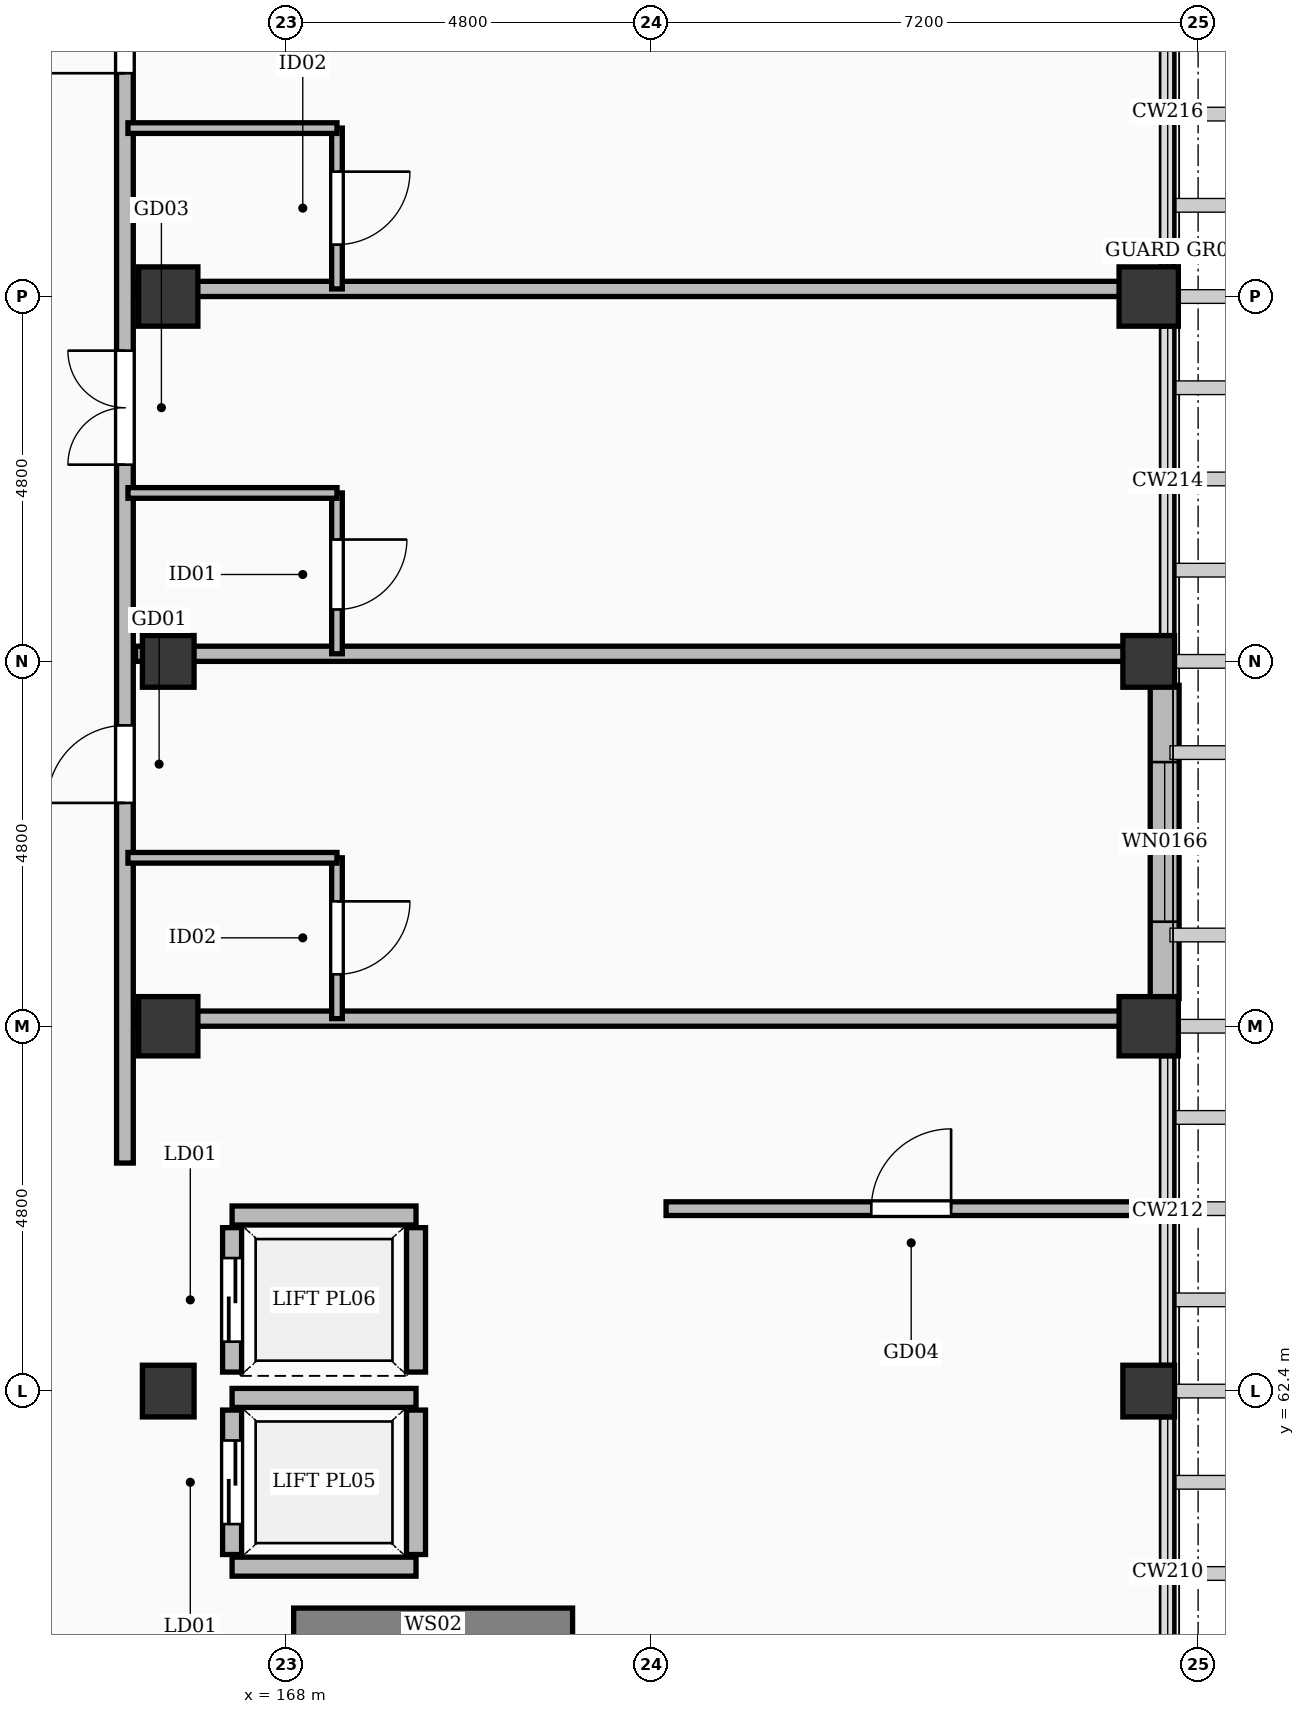
"""IFC4 building model, lengths in metres.
Left out: names, types, materials, properties, quantities, classifications, styles, units other than length and angle.
Written with IfcOpenShell. Run it as: python <this file> out.ifc"""

import sys

from ifc_helpers import new_model, si_unit, direction, frame, frame_2d, origin, origin_2d, place, context, subcontext, project, spatial, rectangle, extrude, element, fill, save


model = new_model("IFC4")
c1 = context("Model", 3, precision=1e-05, world=origin(), true_north=direction((0.0, 1.0)))
c2 = subcontext(c1, "Body", "Model", "MODEL_VIEW")
j1 = project(units=[si_unit("LENGTHUNIT", "METRE"), si_unit("PLANEANGLEUNIT", "RADIAN")], contexts=[c1])
p1 = place(None, origin())
s1 = spatial("IfcSite", under=j1, at=p1, CompositionType="ELEMENT")
p2 = place(p1, origin())
s2 = spatial("IfcBuilding", under=s1, at=p2, CompositionType="ELEMENT")
p3 = place(p2, frame((0.0, 0.0, 24.6)))
s3 = spatial("IfcBuildingStorey", under=s2, at=p3, CompositionType="ELEMENT", Elevation=24.6)
for number, where, z_axis, x_axis in (
    (1, (166.45, 67.2, 0.0), (0.0, 0.0, 1.0), (1.0, 0.0, 0.0)),
    (2, (166.45, 76.8, 0.0), (0.0, 0.0, 1.0), (1.0, 0.0, 0.0)),
    (3, (179.35, 67.2, 0.0), (0.0, 0.0, 1.0), (1.0, 0.0, 0.0)),
    (4, (179.35, 76.8, 0.0), (0.0, 0.0, 1.0), (1.0, 0.0, 0.0)),
):
    element("IfcColumn", number, at=place(p3, frame(where, z_axis=z_axis, x_axis=x_axis)), inside=s3, PredefinedType="COLUMN", context=c2, shape_type="SweptSolid", body=[
        extrude(rectangle(XDim=0.78, YDim=0.78, at=origin_2d()), origin(), (0.0, 0.0, 1.0), 3.6),
    ])
for number, where, z_axis, x_axis in (
    (5, (166.45, 62.4, 0.0), (0.0, 0.0, 1.0), (1.0, 0.0, 0.0)),
    (6, (166.45, 72.0, 0.0), (0.0, 0.0, 1.0), (1.0, 0.0, 0.0)),
    (7, (179.35, 62.4, 0.0), (0.0, 0.0, 1.0), (1.0, 0.0, 0.0)),
    (8, (179.35, 72.0, 0.0), (0.0, 0.0, 1.0), (1.0, 0.0, 0.0)),
):
    element("IfcColumn", number, at=place(p3, frame(where, z_axis=z_axis, x_axis=x_axis)), inside=s3, PredefinedType="COLUMN", context=c2, shape_type="SweptSolid", body=[
        extrude(rectangle(XDim=0.68, YDim=0.68, at=origin_2d()), origin(), (0.0, 0.0, 1.0), 3.6),
    ])
p4 = place(p3, frame((179.56, 71.685, 0.0), z_axis=(0.0, 0.0, 1.0), x_axis=(0.0, -1.0, 0.0)))
e9 = element("IfcWall", 9, at=p4, inside=s3, PredefinedType="SOLIDWALL", context=c2, shape_type="SweptSolid", body=[
    extrude(rectangle(XDim=4.12, YDim=0.38, at=frame_2d((2.06, 0.0))), origin(), (0.0, 0.0, 1.0), 2.582),
])
p5 = place(p4, frame((1.01, 0.0, 0.55)))
e10 = element("IfcOpeningElement", 10, at=p5, cuts=e9, PredefinedType="OPENING", context=c2, shape_type="SweptSolid", body=[
    extrude(rectangle(XDim=2.1, YDim=1.78, at=frame_2d((1.05, 0.89))), frame((0.0, 0.202, 0.0), z_axis=(0.0, -1.0, 0.0), x_axis=(1.0, 0.0, 0.0)), (0.0, 0.0, 1.0), 0.404),
])
p6 = place(p3, frame((168.1, 59.32, 0.0), z_axis=(0.0, 0.0, 1.0), x_axis=(1.0, 0.0, 0.0)))
e11 = element("IfcWall", 11, at=p6, inside=s3, PredefinedType="SHEAR", context=c2, shape_type="SweptSolid", body=[
    extrude(rectangle(XDim=3.67, YDim=0.45, at=frame_2d((1.835, 0.0))), origin(), (0.0, 0.0, 1.0), 3.34),
])
p7 = place(p3, frame((167.29, 60.09, 0.0), z_axis=(0.0, 0.0, 1.0), x_axis=(1.0, 0.0, 0.0)))
e12 = element("IfcWall", 12, at=p7, inside=s3, PredefinedType="SOLIDWALL", context=c2, shape_type="SweptSolid", body=[
    extrude(rectangle(XDim=2.42, YDim=0.25, at=frame_2d((1.21, 0.0))), origin(), (0.0, 0.0, 1.0), 3.34),
])
p8 = place(p3, frame((167.29, 62.31, 0.0), z_axis=(0.0, 0.0, 1.0), x_axis=(1.0, 0.0, 0.0)))
e13 = element("IfcWall", 13, at=p8, inside=s3, PredefinedType="SOLIDWALL", context=c2, shape_type="SweptSolid", body=[
    extrude(rectangle(XDim=2.42, YDim=0.25, at=frame_2d((1.21, 0.0))), origin(), (0.0, 0.0, 1.0), 2.632),
])
p9 = place(p3, frame((167.29, 60.25, 0.0), z_axis=(0.0, 0.0, 1.0), x_axis=(0.0, 1.0, 0.0)))
e14 = element("IfcWall", 14, at=p9, inside=s3, PredefinedType="SOLIDWALL", context=c2, shape_type="SweptSolid", body=[
    extrude(rectangle(XDim=1.9, YDim=0.25, at=frame_2d((0.95, 0.0))), origin(), (0.0, 0.0, 1.0), 2.632),
])
p10 = place(p9, frame((0.4, 0.0, 0.0)))
e15 = element("IfcOpeningElement", 15, at=p10, cuts=e14, PredefinedType="OPENING", context=c2, shape_type="SweptSolid", body=[
    extrude(rectangle(XDim=1.1, YDim=2.2, at=frame_2d((0.55, 1.1))), frame((0.0, 0.137, 0.0), z_axis=(0.0, -1.0, 0.0), x_axis=(1.0, 0.0, 0.0)), (0.0, 0.0, 1.0), 0.274),
])
p11 = place(p3, frame((169.71, 60.25, 0.0), z_axis=(0.0, 0.0, 1.0), x_axis=(0.0, 1.0, 0.0)))
e16 = element("IfcWall", 16, at=p11, inside=s3, PredefinedType="SOLIDWALL", context=c2, shape_type="SweptSolid", body=[
    extrude(rectangle(XDim=1.9, YDim=0.25, at=frame_2d((0.95, 0.0))), origin(), (0.0, 0.0, 1.0), 2.632),
])
p12 = place(p3, frame((167.29, 64.71, 0.0), z_axis=(0.0, 0.0, 1.0), x_axis=(1.0, 0.0, 0.0)))
e17 = element("IfcWall", 17, at=p12, inside=s3, PredefinedType="SOLIDWALL", context=c2, shape_type="SweptSolid", body=[
    extrude(rectangle(XDim=2.42, YDim=0.25, at=frame_2d((1.21, 0.0))), origin(), (0.0, 0.0, 1.0), 3.34),
])
p13 = place(p3, frame((167.29, 62.65, 0.0), z_axis=(0.0, 0.0, 1.0), x_axis=(0.0, 1.0, 0.0)))
e18 = element("IfcWall", 18, at=p13, inside=s3, PredefinedType="SOLIDWALL", context=c2, shape_type="SweptSolid", body=[
    extrude(rectangle(XDim=1.9, YDim=0.25, at=frame_2d((0.95, 0.0))), origin(), (0.0, 0.0, 1.0), 2.632),
])
p14 = place(p13, frame((0.4, 0.0, 0.0)))
e19 = element("IfcOpeningElement", 19, at=p14, cuts=e18, PredefinedType="OPENING", context=c2, shape_type="SweptSolid", body=[
    extrude(rectangle(XDim=1.1, YDim=2.2, at=frame_2d((0.55, 1.1))), frame((0.0, 0.137, 0.0), z_axis=(0.0, -1.0, 0.0), x_axis=(1.0, 0.0, 0.0)), (0.0, 0.0, 1.0), 0.274),
])
p15 = place(p3, frame((169.71, 62.65, 0.0), z_axis=(0.0, 0.0, 1.0), x_axis=(0.0, 1.0, 0.0)))
e20 = element("IfcWall", 20, at=p15, inside=s3, PredefinedType="SOLIDWALL", context=c2, shape_type="SweptSolid", body=[
    extrude(rectangle(XDim=1.9, YDim=0.25, at=frame_2d((0.95, 0.0))), origin(), (0.0, 0.0, 1.0), 2.632),
])
p16 = place(p3, frame((165.88, 65.4, 0.0), z_axis=(0.0, 0.0, 1.0), x_axis=(0.0, 1.0, 0.0)))
e21 = element("IfcWall", 21, at=p16, inside=s3, PredefinedType="PARTITIONING", context=c2, shape_type="SweptSolid", body=[
    extrude(rectangle(XDim=60.25, YDim=0.22, at=frame_2d((30.125, 0.0))), origin(), (0.0, 0.0, 1.0), 2.582),
])
p17 = place(p16, frame((4.738, 0.0, 0.0)))
e22 = element("IfcOpeningElement", 22, at=p17, cuts=e21, PredefinedType="OPENING", context=c2, shape_type="SweptSolid", body=[
    extrude(rectangle(XDim=1.02, YDim=2.2, at=frame_2d((0.51, 1.1))), frame((0.0, 0.122, 0.0), z_axis=(0.0, -1.0, 0.0), x_axis=(1.0, 0.0, 0.0)), (0.0, 0.0, 1.0), 0.244),
])
p18 = place(p16, frame((9.188, 0.0, 0.0)))
e23 = element("IfcOpeningElement", 23, at=p18, cuts=e21, PredefinedType="OPENING", context=c2, shape_type="SweptSolid", body=[
    extrude(rectangle(XDim=1.5, YDim=2.3, at=frame_2d((0.75, 1.15))), frame((0.0, 0.122, 0.0), z_axis=(0.0, -1.0, 0.0), x_axis=(1.0, 0.0, 0.0)), (0.0, 0.0, 1.0), 0.244),
])
p19 = place(p16, frame((14.338, 0.0, 0.0)))
e24 = element("IfcOpeningElement", 24, at=p19, cuts=e21, PredefinedType="OPENING", context=c2, shape_type="SweptSolid", body=[
    extrude(rectangle(XDim=1.12, YDim=2.15, at=frame_2d((0.56, 1.075))), frame((0.0, 0.122, 0.0), z_axis=(0.0, -1.0, 0.0), x_axis=(1.0, 0.0, 0.0)), (0.0, 0.0, 1.0), 0.244),
])
p20 = place(p16, frame((18.788, 0.0, 0.0)))
e25 = element("IfcOpeningElement", 25, at=p20, cuts=e21, PredefinedType="OPENING", context=c2, shape_type="SweptSolid", body=[
    extrude(rectangle(XDim=1.28, YDim=2.16, at=frame_2d((0.64, 1.08))), frame((0.0, 0.122, 0.0), z_axis=(0.0, -1.0, 0.0), x_axis=(1.0, 0.0, 0.0)), (0.0, 0.0, 1.0), 0.244),
])
p21 = place(p16, frame((23.938, 0.0, 0.0)))
e26 = element("IfcOpeningElement", 26, at=p21, cuts=e21, PredefinedType="OPENING", context=c2, shape_type="SweptSolid", body=[
    extrude(rectangle(XDim=1.05, YDim=2.18, at=frame_2d((0.525, 1.09))), frame((0.0, 0.122, 0.0), z_axis=(0.0, -1.0, 0.0), x_axis=(1.0, 0.0, 0.0)), (0.0, 0.0, 1.0), 0.244),
])
p22 = place(p16, frame((28.738, 0.0, 0.0)))
e27 = element("IfcOpeningElement", 27, at=p22, cuts=e21, PredefinedType="OPENING", context=c2, shape_type="SweptSolid", body=[
    extrude(rectangle(XDim=1.08, YDim=2.25, at=frame_2d((0.54, 1.125))), frame((0.0, 0.122, 0.0), z_axis=(0.0, -1.0, 0.0), x_axis=(1.0, 0.0, 0.0)), (0.0, 0.0, 1.0), 0.244),
])
p23 = place(p16, frame((33.538, 0.0, 0.0)))
e28 = element("IfcOpeningElement", 28, at=p23, cuts=e21, PredefinedType="OPENING", context=c2, shape_type="SweptSolid", body=[
    extrude(rectangle(XDim=1.02, YDim=2.2, at=frame_2d((0.51, 1.1))), frame((0.0, 0.122, 0.0), z_axis=(0.0, -1.0, 0.0), x_axis=(1.0, 0.0, 0.0)), (0.0, 0.0, 1.0), 0.244),
])
p24 = place(p16, frame((37.988, 0.0, 0.0)))
e29 = element("IfcOpeningElement", 29, at=p24, cuts=e21, PredefinedType="OPENING", context=c2, shape_type="SweptSolid", body=[
    extrude(rectangle(XDim=1.5, YDim=2.3, at=frame_2d((0.75, 1.15))), frame((0.0, 0.122, 0.0), z_axis=(0.0, -1.0, 0.0), x_axis=(1.0, 0.0, 0.0)), (0.0, 0.0, 1.0), 0.244),
])
p25 = place(p16, frame((43.138, 0.0, 0.0)))
e30 = element("IfcOpeningElement", 30, at=p25, cuts=e21, PredefinedType="OPENING", context=c2, shape_type="SweptSolid", body=[
    extrude(rectangle(XDim=1.12, YDim=2.15, at=frame_2d((0.56, 1.075))), frame((0.0, 0.122, 0.0), z_axis=(0.0, -1.0, 0.0), x_axis=(1.0, 0.0, 0.0)), (0.0, 0.0, 1.0), 0.244),
])
p26 = place(p16, frame((47.588, 0.0, 0.0)))
e31 = element("IfcOpeningElement", 31, at=p26, cuts=e21, PredefinedType="OPENING", context=c2, shape_type="SweptSolid", body=[
    extrude(rectangle(XDim=1.28, YDim=2.16, at=frame_2d((0.64, 1.08))), frame((0.0, 0.122, 0.0), z_axis=(0.0, -1.0, 0.0), x_axis=(1.0, 0.0, 0.0)), (0.0, 0.0, 1.0), 0.244),
])
p27 = place(p16, frame((52.738, 0.0, 0.0)))
e32 = element("IfcOpeningElement", 32, at=p27, cuts=e21, PredefinedType="OPENING", context=c2, shape_type="SweptSolid", body=[
    extrude(rectangle(XDim=1.05, YDim=2.18, at=frame_2d((0.525, 1.09))), frame((0.0, 0.122, 0.0), z_axis=(0.0, -1.0, 0.0), x_axis=(1.0, 0.0, 0.0)), (0.0, 0.0, 1.0), 0.244),
])
p28 = place(p16, frame((57.538, 0.0, 0.0)))
e33 = element("IfcOpeningElement", 33, at=p28, cuts=e21, PredefinedType="OPENING", context=c2, shape_type="SweptSolid", body=[
    extrude(rectangle(XDim=1.08, YDim=2.25, at=frame_2d((0.54, 1.125))), frame((0.0, 0.122, 0.0), z_axis=(0.0, -1.0, 0.0), x_axis=(1.0, 0.0, 0.0)), (0.0, 0.0, 1.0), 0.244),
])
p29 = place(p3, frame((173.0, 64.8, 0.0), z_axis=(0.0, 0.0, 1.0), x_axis=(1.0, 0.0, 0.0)))
e34 = element("IfcWall", 34, at=p29, inside=s3, PredefinedType="PARTITIONING", context=c2, shape_type="SweptSolid", body=[
    extrude(rectangle(XDim=6.2, YDim=0.18, at=frame_2d((3.1, 0.0))), origin(), (0.0, 0.0, 1.0), 2.582),
])
p30 = place(p29, frame((2.7, 0.0, 0.0)))
e35 = element("IfcOpeningElement", 35, at=p30, cuts=e34, PredefinedType="OPENING", context=c2, shape_type="SweptSolid", body=[
    extrude(rectangle(XDim=1.05, YDim=2.22, at=frame_2d((0.525, 1.11))), frame((0.0, 0.102, 0.0), z_axis=(0.0, -1.0, 0.0), x_axis=(1.0, 0.0, 0.0)), (0.0, 0.0, 1.0), 0.204),
])
p31 = place(p3, frame((166.02, 67.3, 0.0), z_axis=(0.0, 0.0, 1.0), x_axis=(1.0, 0.0, 0.0)))
e36 = element("IfcWall", 36, at=p31, inside=s3, PredefinedType="PARTITIONING", context=c2, shape_type="SweptSolid", body=[
    extrude(rectangle(XDim=13.23, YDim=0.2, at=frame_2d((6.615, 0.0))), origin(), (0.0, 0.0, 1.0), 2.582),
])
p32 = place(p3, frame((168.67, 67.3, 0.0), z_axis=(0.0, 0.0, 1.0), x_axis=(0.0, 1.0, 0.0)))
e37 = element("IfcWall", 37, at=p32, inside=s3, PredefinedType="PARTITIONING", context=c2, shape_type="SweptSolid", body=[
    extrude(rectangle(XDim=2.116, YDim=0.14, at=frame_2d((1.058, 0.0))), origin(), (0.0, 0.0, 1.0), 2.632),
])
p33 = place(p32, frame((0.583, 0.0, 0.0)))
e38 = element("IfcOpeningElement", 38, at=p33, cuts=e37, PredefinedType="OPENING", context=c2, shape_type="SweptSolid", body=[
    extrude(rectangle(XDim=0.96, YDim=2.12, at=frame_2d((0.48, 1.06))), frame((0.0, 0.082, 0.0), z_axis=(0.0, -1.0, 0.0), x_axis=(1.0, 0.0, 0.0)), (0.0, 0.0, 1.0), 0.164),
])
p34 = place(p3, frame((165.92, 69.416, 0.0), z_axis=(0.0, 0.0, 1.0), x_axis=(1.0, 0.0, 0.0)))
e39 = element("IfcWall", 39, at=p34, inside=s3, PredefinedType="PARTITIONING", context=c2, shape_type="SweptSolid", body=[
    extrude(rectangle(XDim=2.75, YDim=0.14, at=frame_2d((1.375, 0.0))), origin(), (0.0, 0.0, 1.0), 2.632),
])
p35 = place(p3, frame((166.02, 72.1, 0.0), z_axis=(0.0, 0.0, 1.0), x_axis=(1.0, 0.0, 0.0)))
e40 = element("IfcWall", 40, at=p35, inside=s3, PredefinedType="PARTITIONING", context=c2, shape_type="SweptSolid", body=[
    extrude(rectangle(XDim=13.23, YDim=0.2, at=frame_2d((6.615, 0.0))), origin(), (0.0, 0.0, 1.0), 2.582),
])
p36 = place(p3, frame((168.67, 72.1, 0.0), z_axis=(0.0, 0.0, 1.0), x_axis=(0.0, 1.0, 0.0)))
e41 = element("IfcWall", 41, at=p36, inside=s3, PredefinedType="PARTITIONING", context=c2, shape_type="SweptSolid", body=[
    extrude(rectangle(XDim=2.116, YDim=0.14, at=frame_2d((1.058, 0.0))), origin(), (0.0, 0.0, 1.0), 2.632),
])
p37 = place(p36, frame((0.583, 0.0, 0.0)))
e42 = element("IfcOpeningElement", 42, at=p37, cuts=e41, PredefinedType="OPENING", context=c2, shape_type="SweptSolid", body=[
    extrude(rectangle(XDim=0.92, YDim=2.1, at=frame_2d((0.46, 1.05))), frame((0.0, 0.082, 0.0), z_axis=(0.0, -1.0, 0.0), x_axis=(1.0, 0.0, 0.0)), (0.0, 0.0, 1.0), 0.164),
])
p38 = place(p3, frame((165.92, 74.216, 0.0), z_axis=(0.0, 0.0, 1.0), x_axis=(1.0, 0.0, 0.0)))
e43 = element("IfcWall", 43, at=p38, inside=s3, PredefinedType="PARTITIONING", context=c2, shape_type="SweptSolid", body=[
    extrude(rectangle(XDim=2.75, YDim=0.14, at=frame_2d((1.375, 0.0))), origin(), (0.0, 0.0, 1.0), 2.632),
])
p39 = place(p3, frame((166.02, 76.9, 0.0), z_axis=(0.0, 0.0, 1.0), x_axis=(1.0, 0.0, 0.0)))
e44 = element("IfcWall", 44, at=p39, inside=s3, PredefinedType="PARTITIONING", context=c2, shape_type="SweptSolid", body=[
    extrude(rectangle(XDim=13.23, YDim=0.2, at=frame_2d((6.615, 0.0))), origin(), (0.0, 0.0, 1.0), 2.582),
])
p40 = place(p3, frame((168.67, 76.9, 0.0), z_axis=(0.0, 0.0, 1.0), x_axis=(0.0, 1.0, 0.0)))
e45 = element("IfcWall", 45, at=p40, inside=s3, PredefinedType="PARTITIONING", context=c2, shape_type="SweptSolid", body=[
    extrude(rectangle(XDim=2.116, YDim=0.14, at=frame_2d((1.058, 0.0))), origin(), (0.0, 0.0, 1.0), 2.632),
])
p41 = place(p40, frame((0.583, 0.0, 0.0)))
e46 = element("IfcOpeningElement", 46, at=p41, cuts=e45, PredefinedType="OPENING", context=c2, shape_type="SweptSolid", body=[
    extrude(rectangle(XDim=0.96, YDim=2.12, at=frame_2d((0.48, 1.06))), frame((0.0, 0.082, 0.0), z_axis=(0.0, -1.0, 0.0), x_axis=(1.0, 0.0, 0.0)), (0.0, 0.0, 1.0), 0.164),
])
p42 = place(p3, frame((165.92, 79.016, 0.0), z_axis=(0.0, 0.0, 1.0), x_axis=(1.0, 0.0, 0.0)))
e47 = element("IfcWall", 47, at=p42, inside=s3, PredefinedType="PARTITIONING", context=c2, shape_type="SweptSolid", body=[
    extrude(rectangle(XDim=2.75, YDim=0.14, at=frame_2d((1.375, 0.0))), origin(), (0.0, 0.0, 1.0), 2.632),
])
p43 = place(p5, origin())
e48 = element("IfcWindow", 48, at=p43, inside=s3, PartitioningType="SINGLE_PANEL", PredefinedType="WINDOW", context=c2, shape_type="SweptSolid", body=[
    extrude(rectangle(XDim=2.1, YDim=1.78, at=frame_2d((1.05, 0.89))), frame((0.0, 0.03, 0.0), z_axis=(0.0, -1.0, 0.0), x_axis=(1.0, 0.0, 0.0)), (0.0, 0.0, 1.0), 0.06),
])
fill(e10, e48)
p44 = place(p10, origin())
e49 = element("IfcDoor", 49, at=p44, inside=s3, OperationType="SLIDING_TO_LEFT", PredefinedType="DOOR", context=c2, shape_type="SweptSolid", body=[
    extrude(rectangle(XDim=1.1, YDim=2.2, at=frame_2d((0.55, 1.1))), frame((0.0, 0.025, 0.0), z_axis=(0.0, -1.0, 0.0), x_axis=(1.0, 0.0, 0.0)), (0.0, 0.0, 1.0), 0.05),
])
fill(e15, e49)
p45 = place(p14, origin())
e50 = element("IfcDoor", 50, at=p45, inside=s3, OperationType="SLIDING_TO_LEFT", PredefinedType="DOOR", context=c2, shape_type="SweptSolid", body=[
    extrude(rectangle(XDim=1.1, YDim=2.2, at=frame_2d((0.55, 1.1))), frame((0.0, 0.025, 0.0), z_axis=(0.0, -1.0, 0.0), x_axis=(1.0, 0.0, 0.0)), (0.0, 0.0, 1.0), 0.05),
])
fill(e19, e50)
p46 = place(p30, origin())
e51 = element("IfcDoor", 51, at=p46, inside=s3, OperationType="SINGLE_SWING_RIGHT", PredefinedType="DOOR", context=c2, shape_type="SweptSolid", body=[
    extrude(rectangle(XDim=1.05, YDim=2.22, at=frame_2d((0.525, 1.11))), frame((0.0, 0.025, 0.0), z_axis=(0.0, -1.0, 0.0), x_axis=(1.0, 0.0, 0.0)), (0.0, 0.0, 1.0), 0.05),
])
fill(e35, e51)
p47 = place(p17, origin())
e52 = element("IfcDoor", 52, at=p47, inside=s3, OperationType="SINGLE_SWING_LEFT", PredefinedType="DOOR", context=c2, shape_type="SweptSolid", body=[
    extrude(rectangle(XDim=1.02, YDim=2.2, at=frame_2d((0.51, 1.1))), frame((0.0, 0.025, 0.0), z_axis=(0.0, -1.0, 0.0), x_axis=(1.0, 0.0, 0.0)), (0.0, 0.0, 1.0), 0.05),
])
fill(e22, e52)
p48 = place(p33, frame((0.96, 0.0, 0.0), z_axis=(0.0, 0.0, 1.0), x_axis=(-1.0, 0.0, 0.0)))
e53 = element("IfcDoor", 53, at=p48, inside=s3, OperationType="SINGLE_SWING_RIGHT", PredefinedType="DOOR", context=c2, shape_type="SweptSolid", body=[
    extrude(rectangle(XDim=0.96, YDim=2.12, at=frame_2d((0.48, 1.06))), frame((0.0, 0.025, 0.0), z_axis=(0.0, -1.0, 0.0), x_axis=(1.0, 0.0, 0.0)), (0.0, 0.0, 1.0), 0.05),
])
fill(e38, e53)
p49 = place(p18, origin())
e54 = element("IfcDoor", 54, at=p49, inside=s3, OperationType="DOUBLE_DOOR_SINGLE_SWING", PredefinedType="DOOR", context=c2, shape_type="SweptSolid", body=[
    extrude(rectangle(XDim=1.5, YDim=2.3, at=frame_2d((0.75, 1.15))), frame((0.0, 0.025, 0.0), z_axis=(0.0, -1.0, 0.0), x_axis=(1.0, 0.0, 0.0)), (0.0, 0.0, 1.0), 0.05),
])
fill(e23, e54)
p50 = place(p37, frame((0.92, 0.0, 0.0), z_axis=(0.0, 0.0, 1.0), x_axis=(-1.0, 0.0, 0.0)))
e55 = element("IfcDoor", 55, at=p50, inside=s3, OperationType="SINGLE_SWING_RIGHT", PredefinedType="DOOR", context=c2, shape_type="SweptSolid", body=[
    extrude(rectangle(XDim=0.92, YDim=2.1, at=frame_2d((0.46, 1.05))), frame((0.0, 0.025, 0.0), z_axis=(0.0, -1.0, 0.0), x_axis=(1.0, 0.0, 0.0)), (0.0, 0.0, 1.0), 0.05),
])
fill(e42, e55)
p51 = place(p19, origin())
e56 = element("IfcDoor", 56, at=p51, inside=s3, OperationType="SINGLE_SWING_LEFT", PredefinedType="DOOR", context=c2, shape_type="SweptSolid", body=[
    extrude(rectangle(XDim=1.12, YDim=2.15, at=frame_2d((0.56, 1.075))), frame((0.0, 0.025, 0.0), z_axis=(0.0, -1.0, 0.0), x_axis=(1.0, 0.0, 0.0)), (0.0, 0.0, 1.0), 0.05),
])
fill(e24, e56)
p52 = place(p41, frame((0.96, 0.0, 0.0), z_axis=(0.0, 0.0, 1.0), x_axis=(-1.0, 0.0, 0.0)))
e57 = element("IfcDoor", 57, at=p52, inside=s3, OperationType="SINGLE_SWING_RIGHT", PredefinedType="DOOR", context=c2, shape_type="SweptSolid", body=[
    extrude(rectangle(XDim=0.96, YDim=2.12, at=frame_2d((0.48, 1.06))), frame((0.0, 0.025, 0.0), z_axis=(0.0, -1.0, 0.0), x_axis=(1.0, 0.0, 0.0)), (0.0, 0.0, 1.0), 0.05),
])
fill(e46, e57)
save(model, sys.argv[1])
